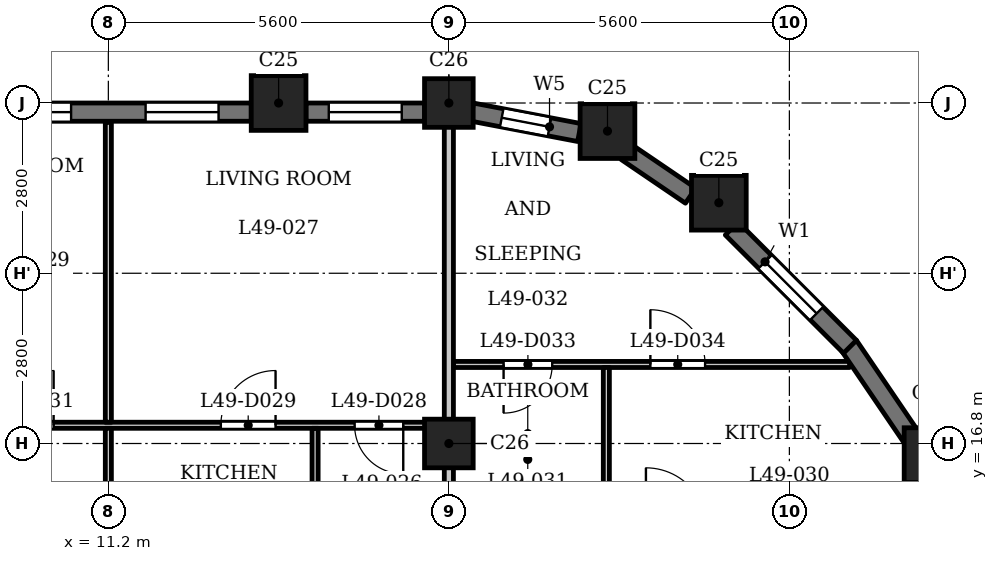
"""IFC4 building model, lengths in metres.
Left out: names, types, materials, properties, quantities, classifications, styles, units other than length and angle.
Written with IfcOpenShell. Run it as: python <this file> out.ifc"""

import sys

from ifc_helpers import new_model, si_unit, direction, frame, frame_2d, origin, origin_2d, place, context, subcontext, project, spatial, rectangle, extrude, element, fill, save


model = new_model("IFC4")
c1 = context("Model", 3, precision=1e-05, world=origin(), true_north=direction((0.0, 1.0)))
c2 = subcontext(c1, "Body", "Model", "MODEL_VIEW")
j1 = project(units=[si_unit("LENGTHUNIT", "METRE"), si_unit("PLANEANGLEUNIT", "RADIAN")], contexts=[c1])
p1 = place(None, origin())
s1 = spatial("IfcSite", under=j1, at=p1, CompositionType="ELEMENT")
p2 = place(p1, origin())
s2 = spatial("IfcBuilding", under=s1, at=p2, CompositionType="ELEMENT")
p3 = place(p2, frame((0.0, 0.0, 192.4)))
s3 = spatial("IfcBuildingStorey", under=s2, at=p3, CompositionType="ELEMENT", Elevation=192.4)
for number, where, z_axis, x_axis in (
    (1, (24.738, 16.609, 0.0), (0.0, 0.0, 1.0), (1.0, 0.0, 0.0)),
    (2, (21.24, 20.76, 0.0), (0.0, 0.0, 1.0), (1.0, 0.0, 0.0)),
    (3, (19.409, 21.938, 0.0), (0.0, 0.0, 1.0), (1.0, 0.0, 0.0)),
    (4, (14.0, 22.4, 0.0), (0.0, 0.0, 1.0), (1.0, 0.0, 0.0)),
):
    element("IfcColumn", number, at=place(p3, frame(where, z_axis=z_axis, x_axis=x_axis)), inside=s3, PredefinedType="COLUMN", context=c2, shape_type="SweptSolid", body=[
        extrude(rectangle(XDim=0.9, YDim=0.9, at=origin_2d()), origin(), (0.0, 0.0, 1.0), 3.5),
    ])
for number, where, z_axis, x_axis in (
    (5, (16.8, 16.8, 0.0), (0.0, 0.0, 1.0), (1.0, 0.0, 0.0)),
    (6, (16.8, 22.4, 0.0), (0.0, 0.0, 1.0), (1.0, 0.0, 0.0)),
):
    element("IfcColumn", number, at=place(p3, frame(where, z_axis=z_axis, x_axis=x_axis)), inside=s3, PredefinedType="COLUMN", context=c2, shape_type="SweptSolid", body=[
        extrude(rectangle(XDim=0.8, YDim=0.8, at=origin_2d()), origin(), (0.0, 0.0, 1.0), 3.5),
    ])
p4 = place(p3, frame((24.394, 16.919, 0.0), z_axis=(0.0, 0.0, 1.0), x_axis=(-0.562040093569, 0.827109988588, 0.0)))
e7 = element("IfcWall", 7, at=p4, inside=s3, PredefinedType="SOLIDWALL", context=c2, shape_type="SweptSolid", body=[
    extrude(rectangle(XDim=1.806, YDim=0.3, at=frame_2d((0.903, 0.0))), origin(), (0.0, 0.0, 1.0), 2.5),
])
p5 = place(p3, frame((23.397, 18.391, 0.0), z_axis=(0.0, 0.0, 1.0), x_axis=(-0.707106781187, 0.707106781187, 0.0)))
e8 = element("IfcWall", 8, at=p5, inside=s3, PredefinedType="SOLIDWALL", context=c2, shape_type="SweptSolid", body=[
    extrude(rectangle(XDim=2.75, YDim=0.3, at=frame_2d((1.375, 0.0))), origin(), (0.0, 0.0, 1.0), 2.5),
])
p6 = place(p5, frame((0.775, 0.0, 0.6)))
e9 = element("IfcOpeningElement", 9, at=p6, cuts=e8, PredefinedType="OPENING", context=c2, shape_type="SweptSolid", body=[
    extrude(rectangle(XDim=1.2, YDim=1.55, at=frame_2d((0.6, 0.775))), frame((0.0, 0.16, 0.0), z_axis=(0.0, -1.0, 0.0), x_axis=(1.0, 0.0, 0.0)), (0.0, 0.0, 1.0), 0.32),
])
p7 = place(p3, frame((20.775, 20.876, 0.0), z_axis=(0.0, 0.0, 1.0), x_axis=(-0.827075824828, 0.562090366388, 0.0)))
e10 = element("IfcWall", 10, at=p7, inside=s3, PredefinedType="SOLIDWALL", context=c2, shape_type="SweptSolid", body=[
    extrude(rectangle(XDim=1.277, YDim=0.3, at=frame_2d((0.638, 0.0))), origin(), (0.0, 0.0, 1.0), 2.5),
])
p8 = place(p3, frame((18.946, 21.914, 0.0), z_axis=(0.0, 0.0, 1.0), x_axis=(-0.98230529033, 0.187286722942, 0.0)))
e11 = element("IfcWall", 11, at=p8, inside=s3, PredefinedType="SOLIDWALL", context=c2, shape_type="SweptSolid", body=[
    extrude(rectangle(XDim=1.799, YDim=0.3, at=frame_2d((0.899, 0.0))), origin(), (0.0, 0.0, 1.0), 2.5),
])
p9 = place(p8, frame((0.5, 0.0, 0.6)))
e12 = element("IfcOpeningElement", 12, at=p9, cuts=e11, PredefinedType="OPENING", context=c2, shape_type="SweptSolid", body=[
    extrude(rectangle(XDim=0.8, YDim=1.55, at=frame_2d((0.4, 0.775))), frame((0.0, 0.16, 0.0), z_axis=(0.0, -1.0, 0.0), x_axis=(1.0, 0.0, 0.0)), (0.0, 0.0, 1.0), 0.32),
])
p10 = place(p3, frame((16.4, 22.25, 0.0), z_axis=(0.0, 0.0, 1.0), x_axis=(-1.0, 0.0, 0.0)))
e13 = element("IfcWall", 13, at=p10, inside=s3, PredefinedType="SOLIDWALL", context=c2, shape_type="SweptSolid", body=[
    extrude(rectangle(XDim=1.95, YDim=0.3, at=frame_2d((0.975, 0.0))), origin(), (0.0, 0.0, 1.0), 2.5),
])
p11 = place(p10, frame((0.375, 0.0, 0.6)))
e14 = element("IfcOpeningElement", 14, at=p11, cuts=e13, PredefinedType="OPENING", context=c2, shape_type="SweptSolid", body=[
    extrude(rectangle(XDim=1.2, YDim=1.55, at=frame_2d((0.6, 0.775))), frame((0.0, 0.16, 0.0), z_axis=(0.0, -1.0, 0.0), x_axis=(1.0, 0.0, 0.0)), (0.0, 0.0, 1.0), 0.32),
])
p12 = place(p3, frame((13.55, 22.25, 0.0), z_axis=(0.0, 0.0, 1.0), x_axis=(-1.0, 0.0, 0.0)))
e15 = element("IfcWall", 15, at=p12, inside=s3, PredefinedType="SOLIDWALL", context=c2, shape_type="SweptSolid", body=[
    extrude(rectangle(XDim=4.7, YDim=0.3, at=frame_2d((2.35, 0.0))), origin(), (0.0, 0.0, 1.0), 2.5),
])
p13 = place(p12, frame((0.538, 0.0, 0.6)))
e16 = element("IfcOpeningElement", 16, at=p13, cuts=e15, PredefinedType="OPENING", context=c2, shape_type="SweptSolid", body=[
    extrude(rectangle(XDim=1.2, YDim=1.55, at=frame_2d((0.6, 0.775))), frame((0.0, 0.16, 0.0), z_axis=(0.0, -1.0, 0.0), x_axis=(1.0, 0.0, 0.0)), (0.0, 0.0, 1.0), 0.32),
])
p14 = place(p12, frame((2.962, 0.0, 0.6)))
e17 = element("IfcOpeningElement", 17, at=p14, cuts=e15, PredefinedType="OPENING", context=c2, shape_type="SweptSolid", body=[
    extrude(rectangle(XDim=1.2, YDim=1.55, at=frame_2d((0.6, 0.775))), frame((0.0, 0.16, 0.0), z_axis=(0.0, -1.0, 0.0), x_axis=(1.0, 0.0, 0.0)), (0.0, 0.0, 1.0), 0.32),
])
p15 = place(p3, frame((-16.725, 17.1, 0.0), z_axis=(0.0, 0.0, 1.0), x_axis=(1.0, 0.0, 0.0)))
e18 = element("IfcWall", 18, at=p15, inside=s3, PredefinedType="PARTITIONING", context=c2, shape_type="SweptSolid", body=[
    extrude(rectangle(XDim=33.45, YDim=0.1, at=frame_2d((16.725, 0.0))), origin(), (0.0, 0.0, 1.0), 3.2),
])
p16 = place(p15, frame((4.075, 0.0, 0.0)))
e19 = element("IfcOpeningElement", 19, at=p16, cuts=e18, PredefinedType="OPENING", context=c2, shape_type="SweptSolid", body=[
    extrude(rectangle(XDim=0.8, YDim=2.1, at=frame_2d((0.4, 1.05))), frame((0.0, 0.06, 0.0), z_axis=(0.0, -1.0, 0.0), x_axis=(1.0, 0.0, 0.0)), (0.0, 0.0, 1.0), 0.12),
])
p17 = place(p15, frame((9.575, 0.0, 0.0)))
e20 = element("IfcOpeningElement", 20, at=p17, cuts=e18, PredefinedType="OPENING", context=c2, shape_type="SweptSolid", body=[
    extrude(rectangle(XDim=0.9, YDim=2.1, at=frame_2d((0.45, 1.05))), frame((0.0, 0.06, 0.0), z_axis=(0.0, -1.0, 0.0), x_axis=(1.0, 0.0, 0.0)), (0.0, 0.0, 1.0), 0.12),
])
p18 = place(p15, frame((15.175, 0.0, 0.0)))
e21 = element("IfcOpeningElement", 21, at=p18, cuts=e18, PredefinedType="OPENING", context=c2, shape_type="SweptSolid", body=[
    extrude(rectangle(XDim=0.8, YDim=2.1, at=frame_2d((0.4, 1.05))), frame((0.0, 0.06, 0.0), z_axis=(0.0, -1.0, 0.0), x_axis=(1.0, 0.0, 0.0)), (0.0, 0.0, 1.0), 0.12),
])
p19 = place(p15, frame((12.975, 0.0, 0.0)))
e22 = element("IfcOpeningElement", 22, at=p19, cuts=e18, PredefinedType="OPENING", context=c2, shape_type="SweptSolid", body=[
    extrude(rectangle(XDim=0.9, YDim=2.1, at=frame_2d((0.45, 1.05))), frame((0.0, 0.06, 0.0), z_axis=(0.0, -1.0, 0.0), x_axis=(1.0, 0.0, 0.0)), (0.0, 0.0, 1.0), 0.12),
])
p20 = place(p15, frame((17.625, 0.0, 0.0)))
e23 = element("IfcOpeningElement", 23, at=p20, cuts=e18, PredefinedType="OPENING", context=c2, shape_type="SweptSolid", body=[
    extrude(rectangle(XDim=0.8, YDim=2.1, at=frame_2d((0.4, 1.05))), frame((0.0, 0.06, 0.0), z_axis=(0.0, -1.0, 0.0), x_axis=(1.0, 0.0, 0.0)), (0.0, 0.0, 1.0), 0.12),
])
p21 = place(p15, frame((20.025, 0.0, 0.0)))
e24 = element("IfcOpeningElement", 24, at=p21, cuts=e18, PredefinedType="OPENING", context=c2, shape_type="SweptSolid", body=[
    extrude(rectangle(XDim=0.9, YDim=2.1, at=frame_2d((0.45, 1.05))), frame((0.0, 0.06, 0.0), z_axis=(0.0, -1.0, 0.0), x_axis=(1.0, 0.0, 0.0)), (0.0, 0.0, 1.0), 0.12),
])
p22 = place(p15, frame((31.975, 0.0, 0.0)))
e25 = element("IfcOpeningElement", 25, at=p22, cuts=e18, PredefinedType="OPENING", context=c2, shape_type="SweptSolid", body=[
    extrude(rectangle(XDim=0.8, YDim=2.1, at=frame_2d((0.4, 1.05))), frame((0.0, 0.06, 0.0), z_axis=(0.0, -1.0, 0.0), x_axis=(1.0, 0.0, 0.0)), (0.0, 0.0, 1.0), 0.12),
])
p23 = place(p15, frame((29.775, 0.0, 0.0)))
e26 = element("IfcOpeningElement", 26, at=p23, cuts=e18, PredefinedType="OPENING", context=c2, shape_type="SweptSolid", body=[
    extrude(rectangle(XDim=0.9, YDim=2.1, at=frame_2d((0.45, 1.05))), frame((0.0, 0.06, 0.0), z_axis=(0.0, -1.0, 0.0), x_axis=(1.0, 0.0, 0.0)), (0.0, 0.0, 1.0), 0.12),
])
p24 = place(p15, frame((23.025, 0.0, 0.0)))
e27 = element("IfcOpeningElement", 27, at=p24, cuts=e18, PredefinedType="OPENING", context=c2, shape_type="SweptSolid", body=[
    extrude(rectangle(XDim=0.9, YDim=2.1, at=frame_2d((0.45, 1.05))), frame((0.0, 0.06, 0.0), z_axis=(0.0, -1.0, 0.0), x_axis=(1.0, 0.0, 0.0)), (0.0, 0.0, 1.0), 0.12),
])
p25 = place(p15, frame((26.125, 0.0, 0.0)))
e28 = element("IfcOpeningElement", 28, at=p25, cuts=e18, PredefinedType="OPENING", context=c2, shape_type="SweptSolid", body=[
    extrude(rectangle(XDim=0.9, YDim=2.1, at=frame_2d((0.45, 1.05))), frame((0.0, 0.06, 0.0), z_axis=(0.0, -1.0, 0.0), x_axis=(1.0, 0.0, 0.0)), (0.0, 0.0, 1.0), 0.12),
])
p26 = place(p3, frame((16.875, 18.1, 0.0), z_axis=(0.0, 0.0, 1.0), x_axis=(1.0, 0.0, 0.0)))
e29 = element("IfcWall", 29, at=p26, inside=s3, PredefinedType="PARTITIONING", context=c2, shape_type="SweptSolid", body=[
    extrude(rectangle(XDim=6.515, YDim=0.1, at=frame_2d((3.258, 0.0))), origin(), (0.0, 0.0, 1.0), 3.2),
])
p27 = place(p26, frame((0.825, 0.0, 0.0)))
e30 = element("IfcOpeningElement", 30, at=p27, cuts=e29, PredefinedType="OPENING", context=c2, shape_type="SweptSolid", body=[
    extrude(rectangle(XDim=0.8, YDim=2.1, at=frame_2d((0.4, 1.05))), frame((0.0, 0.06, 0.0), z_axis=(0.0, -1.0, 0.0), x_axis=(1.0, 0.0, 0.0)), (0.0, 0.0, 1.0), 0.12),
])
p28 = place(p26, frame((3.239, 0.0, 0.0)))
e31 = element("IfcOpeningElement", 31, at=p28, cuts=e29, PredefinedType="OPENING", context=c2, shape_type="SweptSolid", body=[
    extrude(rectangle(XDim=0.9, YDim=2.1, at=frame_2d((0.45, 1.05))), frame((0.0, 0.06, 0.0), z_axis=(0.0, -1.0, 0.0), x_axis=(1.0, 0.0, 0.0)), (0.0, 0.0, 1.0), 0.12),
])
p29 = place(p3, frame((11.2, 13.275, 0.0), z_axis=(0.0, 0.0, 1.0), x_axis=(0.0, 1.0, 0.0)))
e32 = element("IfcWall", 32, at=p29, inside=s3, PredefinedType="PARTITIONING", context=c2, shape_type="SweptSolid", body=[
    extrude(rectangle(XDim=3.775, YDim=0.1, at=frame_2d((1.888, 0.0))), origin(), (0.0, 0.0, 1.0), 3.2),
])
p30 = place(p29, frame((0.576, 0.0, 0.0)))
e33 = element("IfcOpeningElement", 33, at=p30, cuts=e32, PredefinedType="OPENING", context=c2, shape_type="SweptSolid", body=[
    extrude(rectangle(XDim=0.9, YDim=2.1, at=frame_2d((0.45, 1.05))), frame((0.0, 0.06, 0.0), z_axis=(0.0, -1.0, 0.0), x_axis=(1.0, 0.0, 0.0)), (0.0, 0.0, 1.0), 0.12),
])
p31 = place(p3, frame((11.2, 17.15, 0.0), z_axis=(0.0, 0.0, 1.0), x_axis=(0.0, 1.0, 0.0)))
e34 = element("IfcWall", 34, at=p31, inside=s3, PredefinedType="PARTITIONING", context=c2, shape_type="SweptSolid", body=[
    extrude(rectangle(XDim=4.93, YDim=0.1, at=frame_2d((2.465, 0.0))), origin(), (0.0, 0.0, 1.0), 3.2),
])
p32 = place(p3, frame((14.6, 13.275, 0.0), z_axis=(0.0, 0.0, 1.0), x_axis=(0.0, 1.0, 0.0)))
e35 = element("IfcWall", 35, at=p32, inside=s3, PredefinedType="PARTITIONING", context=c2, shape_type="SweptSolid", body=[
    extrude(rectangle(XDim=3.775, YDim=0.1, at=frame_2d((1.888, 0.0))), origin(), (0.0, 0.0, 1.0), 3.2),
])
p33 = place(p3, frame((16.8, 15.475, 0.0), z_axis=(0.0, 0.0, 1.0), x_axis=(0.0, 1.0, 0.0)))
e36 = element("IfcWall", 36, at=p33, inside=s3, PredefinedType="PARTITIONING", context=c2, shape_type="SweptSolid", body=[
    extrude(rectangle(XDim=6.835, YDim=0.15, at=frame_2d((3.417, 0.0))), origin(), (0.0, 0.0, 1.0), 2.55),
])
p34 = place(p3, frame((19.39, 15.475, 0.0), z_axis=(0.0, 0.0, 1.0), x_axis=(0.0, 1.0, 0.0)))
e37 = element("IfcWall", 37, at=p34, inside=s3, PredefinedType="PARTITIONING", context=c2, shape_type="SweptSolid", body=[
    extrude(rectangle(XDim=2.575, YDim=0.1, at=frame_2d((1.288, 0.0))), origin(), (0.0, 0.0, 1.0), 3.2),
])
p35 = place(p22, origin())
e38 = element("IfcDoor", 38, at=p35, inside=s3, OperationType="SINGLE_SWING_RIGHT", PredefinedType="DOOR", context=c2, shape_type="SweptSolid", body=[
    extrude(rectangle(XDim=0.8, YDim=2.1, at=frame_2d((0.4, 1.05))), frame((0.0, 0.025, 0.0), z_axis=(0.0, -1.0, 0.0), x_axis=(1.0, 0.0, 0.0)), (0.0, 0.0, 1.0), 0.05),
])
fill(e25, e38)
p36 = place(p23, origin())
e39 = element("IfcDoor", 39, at=p36, inside=s3, OperationType="SINGLE_SWING_LEFT", PredefinedType="DOOR", context=c2, shape_type="SweptSolid", body=[
    extrude(rectangle(XDim=0.9, YDim=2.1, at=frame_2d((0.45, 1.05))), frame((0.0, 0.025, 0.0), z_axis=(0.0, -1.0, 0.0), x_axis=(1.0, 0.0, 0.0)), (0.0, 0.0, 1.0), 0.05),
])
fill(e26, e39)
p37 = place(p25, origin())
e40 = element("IfcDoor", 40, at=p37, inside=s3, OperationType="SINGLE_SWING_LEFT", PredefinedType="DOOR", context=c2, shape_type="SweptSolid", body=[
    extrude(rectangle(XDim=0.9, YDim=2.1, at=frame_2d((0.45, 1.05))), frame((0.0, 0.025, 0.0), z_axis=(0.0, -1.0, 0.0), x_axis=(1.0, 0.0, 0.0)), (0.0, 0.0, 1.0), 0.05),
])
fill(e28, e40)
p38 = place(p27, origin())
e41 = element("IfcDoor", 41, at=p38, inside=s3, OperationType="SINGLE_SWING_LEFT", PredefinedType="DOOR", context=c2, shape_type="SweptSolid", body=[
    extrude(rectangle(XDim=0.8, YDim=2.1, at=frame_2d((0.4, 1.05))), frame((0.0, 0.025, 0.0), z_axis=(0.0, -1.0, 0.0), x_axis=(1.0, 0.0, 0.0)), (0.0, 0.0, 1.0), 0.05),
])
fill(e30, e41)
p39 = place(p28, origin())
e42 = element("IfcDoor", 42, at=p39, inside=s3, OperationType="SINGLE_SWING_RIGHT", PredefinedType="DOOR", context=c2, shape_type="SweptSolid", body=[
    extrude(rectangle(XDim=0.9, YDim=2.1, at=frame_2d((0.45, 1.05))), frame((0.0, 0.025, 0.0), z_axis=(0.0, -1.0, 0.0), x_axis=(1.0, 0.0, 0.0)), (0.0, 0.0, 1.0), 0.05),
])
fill(e31, e42)
p40 = place(p6, origin())
e43 = element("IfcWindow", 43, at=p40, inside=s3, PartitioningType="SINGLE_PANEL", PredefinedType="WINDOW", context=c2, shape_type="SweptSolid", body=[
    extrude(rectangle(XDim=1.2, YDim=1.55, at=frame_2d((0.6, 0.775))), frame((0.0, 0.03, 0.0), z_axis=(0.0, -1.0, 0.0), x_axis=(1.0, 0.0, 0.0)), (0.0, 0.0, 1.0), 0.06),
])
fill(e9, e43)
p41 = place(p9, origin())
e44 = element("IfcWindow", 44, at=p41, inside=s3, PartitioningType="SINGLE_PANEL", PredefinedType="WINDOW", context=c2, shape_type="SweptSolid", body=[
    extrude(rectangle(XDim=0.8, YDim=1.55, at=frame_2d((0.4, 0.775))), frame((0.0, 0.03, 0.0), z_axis=(0.0, -1.0, 0.0), x_axis=(1.0, 0.0, 0.0)), (0.0, 0.0, 1.0), 0.06),
])
fill(e12, e44)
p42 = place(p11, origin())
e45 = element("IfcWindow", 45, at=p42, inside=s3, PartitioningType="SINGLE_PANEL", PredefinedType="WINDOW", context=c2, shape_type="SweptSolid", body=[
    extrude(rectangle(XDim=1.2, YDim=1.55, at=frame_2d((0.6, 0.775))), frame((0.0, 0.03, 0.0), z_axis=(0.0, -1.0, 0.0), x_axis=(1.0, 0.0, 0.0)), (0.0, 0.0, 1.0), 0.06),
])
fill(e14, e45)
p43 = place(p13, origin())
e46 = element("IfcWindow", 46, at=p43, inside=s3, PartitioningType="SINGLE_PANEL", PredefinedType="WINDOW", context=c2, shape_type="SweptSolid", body=[
    extrude(rectangle(XDim=1.2, YDim=1.55, at=frame_2d((0.6, 0.775))), frame((0.0, 0.03, 0.0), z_axis=(0.0, -1.0, 0.0), x_axis=(1.0, 0.0, 0.0)), (0.0, 0.0, 1.0), 0.06),
])
fill(e16, e46)
p44 = place(p14, origin())
e47 = element("IfcWindow", 47, at=p44, inside=s3, PartitioningType="SINGLE_PANEL", PredefinedType="WINDOW", context=c2, shape_type="SweptSolid", body=[
    extrude(rectangle(XDim=1.2, YDim=1.55, at=frame_2d((0.6, 0.775))), frame((0.0, 0.03, 0.0), z_axis=(0.0, -1.0, 0.0), x_axis=(1.0, 0.0, 0.0)), (0.0, 0.0, 1.0), 0.06),
])
fill(e17, e47)
save(model, sys.argv[1])
